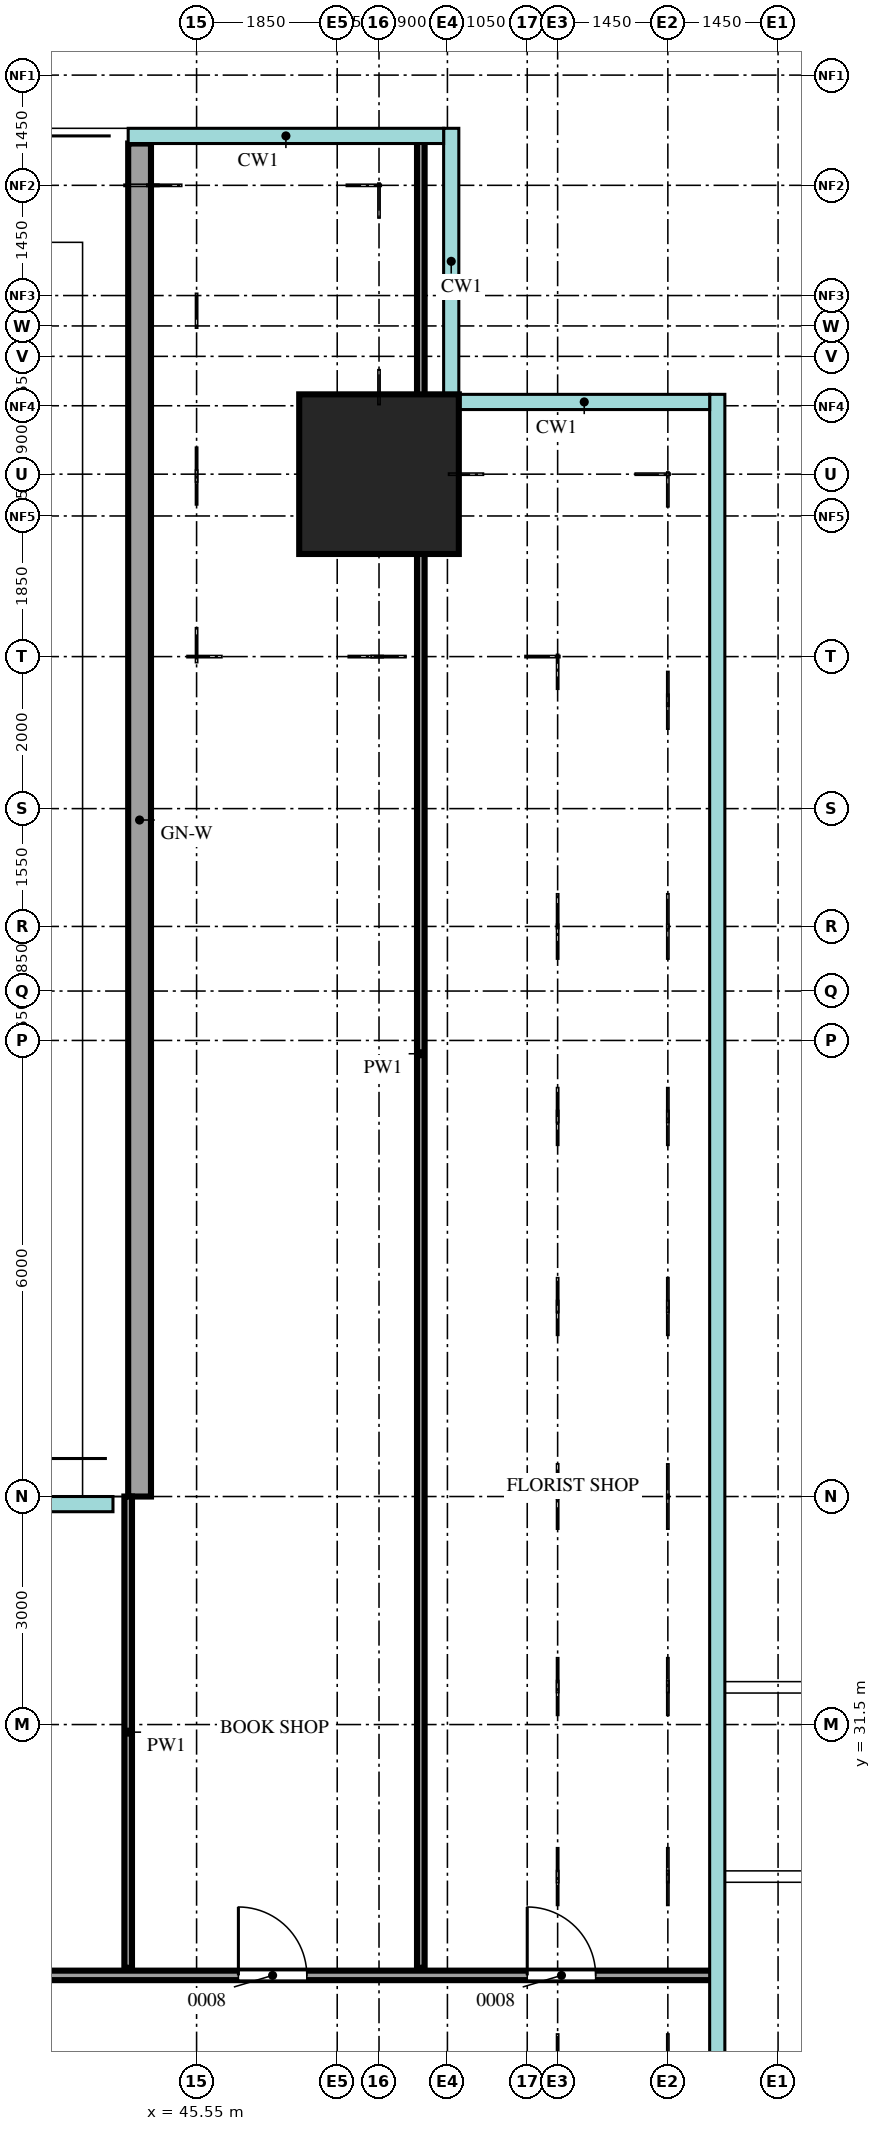
"""IFC4 building model, lengths in metres.
Left out: names, types, materials, properties, quantities, classifications, styles, units other than length and angle.
Written with IfcOpenShell. Run it as: python <this file> out.ifc"""

import sys

from ifc_helpers import new_model, si_unit, direction, frame, frame_2d, origin, origin_2d, place, context, subcontext, project, spatial, rectangle, extrude, source, transform, mapped, element, fill, save


model = new_model("IFC4")
c1 = context("Model", 3, precision=1e-05, world=origin(), true_north=direction((0.0, 1.0)))
c2 = subcontext(c1, "Body", "Model", "MODEL_VIEW")
j1 = project(units=[si_unit("LENGTHUNIT", "METRE"), si_unit("PLANEANGLEUNIT", "RADIAN")], contexts=[c1])
p1 = place(None, origin())
s1 = spatial("IfcSite", under=j1, at=p1, CompositionType="ELEMENT")
p2 = place(p1, origin())
s2 = spatial("IfcBuilding", under=s1, at=p2, CompositionType="ELEMENT")
p3 = place(p2, frame((0.0, 0.0, 158.7)))
s3 = spatial("IfcBuildingStorey", under=s2, at=p3, CompositionType="ELEMENT", Elevation=158.7)
m1 = source(origin(), c2, "Body", "SweptSolid", [
    extrude(rectangle(XDim=2.1, YDim=2.1, at=origin_2d()), origin(), (0.0, 0.0, 1.0), 6.0),
])
p4 = place(p3, frame((47.95, 47.95, 0.0), z_axis=(0.0, 0.0, 1.0), x_axis=(1.0, 0.0, 0.0)))
e1 = element("IfcColumn", 1, at=p4, inside=s3, PredefinedType="COLUMN", context=c2, shape_type="MappedRepresentation", body=[
    mapped(m1, transform((0.0, 0.0, 0.0))),
])
m2 = source(origin(), c2, "Body", "SweptSolid", [
    extrude(rectangle(XDim=17.8, YDim=0.3, at=frame_2d((8.9, 0.0))), origin(), (0.0, 0.0, 1.0), 5.55),
])
p5 = place(p3, frame((44.8, 52.3, 0.0), z_axis=(0.0, 0.0, 1.0), x_axis=(0.0, -1.0, 0.0)))
e2 = element("IfcWall", 2, at=p5, inside=s3, PredefinedType="SOLIDWALL", context=c2, shape_type="MappedRepresentation", body=[
    mapped(m2, transform((0.0, 0.0, 0.0))),
])
m3 = source(origin(), c2, "Body", "SweptSolid", [
    extrude(rectangle(XDim=26.0, YDim=0.125, at=frame_2d((13.0, 0.0))), origin(), (0.0, 0.0, 1.0), 5.75),
])
p6 = place(p3, frame((26.35, 28.2, 0.0), z_axis=(0.0, 0.0, 1.0), x_axis=(1.0, 0.0, 0.0)))
e3 = element("IfcWall", 3, at=p6, inside=s3, PredefinedType="PARTITIONING", context=c2, shape_type="MappedRepresentation", body=[
    mapped(m3, transform((0.0, 0.0, 0.0))),
])
m4 = source(origin(), c2, "Body", "SweptSolid", [
    extrude(rectangle(XDim=0.9, YDim=2.1, at=frame_2d((0.45, 1.05))), frame((0.0, 0.073, 0.0), z_axis=(0.0, -1.0, 0.0), x_axis=(1.0, 0.0, 0.0)), (0.0, 0.0, 1.0), 0.145),
])
p7 = place(p6, frame((19.75, 0.0, 0.0)))
e4 = element("IfcOpeningElement", 4, at=p7, cuts=e3, PredefinedType="OPENING", context=c2, shape_type="MappedRepresentation", body=[
    mapped(m4, transform((0.0, 0.0, 0.0))),
])
p8 = place(p6, frame((23.55, 0.0, 0.0)))
e5 = element("IfcOpeningElement", 5, at=p8, cuts=e3, PredefinedType="OPENING", context=c2, shape_type="MappedRepresentation", body=[
    mapped(m4, transform((0.0, 0.0, 0.0))),
])
m5 = source(origin(), c2, "Body", "SweptSolid", [
    extrude(rectangle(XDim=1.2, YDim=2.1, at=frame_2d((0.6, 1.05))), frame((0.0, 0.073, 0.0), z_axis=(0.0, -1.0, 0.0), x_axis=(1.0, 0.0, 0.0)), (0.0, 0.0, 1.0), 0.145),
])
p9 = place(p6, frame((4.25, 0.0, 0.0)))
e6 = element("IfcOpeningElement", 6, at=p9, cuts=e3, PredefinedType="OPENING", context=c2, shape_type="MappedRepresentation", body=[
    mapped(m5, transform((0.0, 0.0, 0.0))),
])
p10 = place(p6, frame((13.35, 0.0, 0.0)))
e7 = element("IfcOpeningElement", 7, at=p10, cuts=e3, PredefinedType="OPENING", context=c2, shape_type="MappedRepresentation", body=[
    mapped(m5, transform((0.0, 0.0, 0.0))),
])
m6 = source(origin(), c2, "Body", "SweptSolid", [
    extrude(rectangle(XDim=6.2, YDim=0.1, at=frame_2d((3.1, 0.0))), origin(), (0.0, 0.0, 1.0), 5.75),
])
p11 = place(p3, frame((44.65, 28.3, 0.0), z_axis=(0.0, 0.0, 1.0), x_axis=(0.0, 1.0, 0.0)))
e8 = element("IfcWall", 8, at=p11, inside=s3, PredefinedType="PARTITIONING", context=c2, shape_type="MappedRepresentation", body=[
    mapped(m6, transform((0.0, 0.0, 0.0))),
])
m7 = source(origin(), c2, "Body", "SweptSolid", [
    extrude(rectangle(XDim=24.05, YDim=0.1, at=frame_2d((12.025, 0.0))), origin(), (0.0, 0.0, 1.0), 5.75),
])
p12 = place(p3, frame((48.5, 28.3, 0.0), z_axis=(0.0, 0.0, 1.0), x_axis=(0.0, 1.0, 0.0)))
e9 = element("IfcWall", 9, at=p12, inside=s3, PredefinedType="PARTITIONING", context=c2, shape_type="MappedRepresentation", body=[
    mapped(m7, transform((0.0, 0.0, 0.0))),
])
m8 = source(origin(), c2, "Body", "SweptSolid", [
    extrude(rectangle(XDim=0.9, YDim=2.1, at=frame_2d((0.45, 1.05))), frame((0.0, 0.025, 0.0), z_axis=(0.0, -1.0, 0.0), x_axis=(1.0, 0.0, 0.0)), (0.0, 0.0, 1.0), 0.05),
])
p13 = place(p7, origin())
e10 = element("IfcDoor", 10, at=p13, inside=s3, OperationType="SINGLE_SWING_RIGHT", PredefinedType="DOOR", context=c2, shape_type="MappedRepresentation", body=[
    mapped(m8, transform((0.0, 0.0, 0.0))),
])
fill(e4, e10)
p14 = place(p8, origin())
e11 = element("IfcDoor", 11, at=p14, inside=s3, OperationType="SINGLE_SWING_RIGHT", PredefinedType="DOOR", context=c2, shape_type="MappedRepresentation", body=[
    mapped(m8, transform((0.0, 0.0, 0.0))),
])
fill(e5, e11)
save(model, sys.argv[1])
